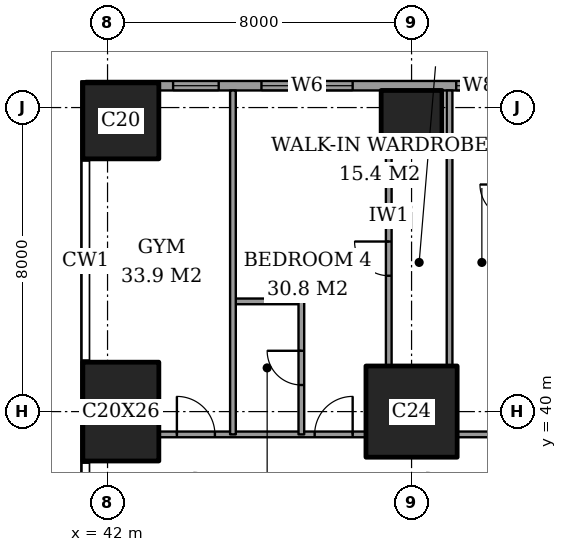
"""IFC4 building model, lengths in metres.
Left out: names, types, materials, properties, quantities, classifications, styles, units other than length and angle.
Written with IfcOpenShell. Run it as: python <this file> out.ifc"""

import sys

from ifc_helpers import new_model, si_unit, direction, frame, frame_2d, origin, origin_2d, place, context, subcontext, project, spatial, rectangle, extrude, element, fill, save


model = new_model("IFC4")
c1 = context("Model", 3, precision=1e-05, world=origin(), true_north=direction((0.0, 1.0)))
c2 = subcontext(c1, "Body", "Model", "MODEL_VIEW")
j1 = project(units=[si_unit("LENGTHUNIT", "METRE"), si_unit("PLANEANGLEUNIT", "RADIAN")], contexts=[c1])
p1 = place(None, origin())
s1 = spatial("IfcSite", under=j1, at=p1, CompositionType="ELEMENT")
p2 = place(p1, origin())
s2 = spatial("IfcBuilding", under=s1, at=p2, CompositionType="ELEMENT")
p3 = place(p2, frame((0.0, 0.0, 259.2)))
s3 = spatial("IfcBuildingStorey", under=s2, at=p3, CompositionType="ELEMENT", Elevation=259.2)
p4 = place(p3, frame((42.35, 40.0, 0.0), z_axis=(0.0, 0.0, 1.0), x_axis=(1.0, 0.0, 0.0)))
e1 = element("IfcColumn", 1, at=p4, inside=s3, PredefinedType="COLUMN", context=c2, shape_type="SweptSolid", body=[
    extrude(rectangle(XDim=2.0, YDim=2.6, at=origin_2d()), origin(), (0.0, 0.0, 1.0), 3.6),
])
p5 = place(p3, frame((42.35, 47.65, 0.0), z_axis=(0.0, 0.0, 1.0), x_axis=(1.0, 0.0, 0.0)))
e2 = element("IfcColumn", 2, at=p5, inside=s3, PredefinedType="COLUMN", context=c2, shape_type="SweptSolid", body=[
    extrude(rectangle(XDim=2.0, YDim=2.0, at=origin_2d()), origin(), (0.0, 0.0, 1.0), 3.6),
])
p6 = place(p3, frame((50.0, 40.0, 0.0), z_axis=(0.0, 0.0, 1.0), x_axis=(1.0, 0.0, 0.0)))
e3 = element("IfcColumn", 3, at=p6, inside=s3, PredefinedType="COLUMN", context=c2, shape_type="SweptSolid", body=[
    extrude(rectangle(XDim=2.4, YDim=2.4, at=origin_2d()), origin(), (0.0, 0.0, 1.0), 3.6),
])
p7 = place(p3, frame((50.0, 47.65, 0.0), z_axis=(0.0, 0.0, 1.0), x_axis=(1.0, 0.0, 0.0)))
e4 = element("IfcColumn", 4, at=p7, inside=s3, PredefinedType="COLUMN", context=c2, shape_type="SweptSolid", body=[
    extrude(rectangle(XDim=1.6, YDim=1.6, at=origin_2d()), origin(), (0.0, 0.0, 1.0), 3.6),
])
p8 = place(p3, frame((62.825, 48.575, 0.0), z_axis=(0.0, 0.0, 1.0), x_axis=(-1.0, 0.0, 0.0)))
e5 = element("IfcWall", 5, at=p8, inside=s3, PredefinedType="SOLIDWALL", context=c2, shape_type="SweptSolid", body=[
    extrude(rectangle(XDim=21.4, YDim=0.25, at=frame_2d((10.7, 0.0))), origin(), (0.0, 0.0, 1.0), 3.6),
])
p9 = place(p8, frame((0.5, 0.0, 0.6)))
e6 = element("IfcOpeningElement", 6, at=p9, cuts=e5, PredefinedType="OPENING", context=c2, shape_type="SweptSolid", body=[
    extrude(rectangle(XDim=1.2, YDim=2.0, at=frame_2d((0.6, 1.0))), frame((0.0, 0.135, 0.0), z_axis=(0.0, -1.0, 0.0), x_axis=(1.0, 0.0, 0.0)), (0.0, 0.0, 1.0), 0.27),
])
p10 = place(p8, frame((2.45, 0.0, 0.6)))
e7 = element("IfcOpeningElement", 7, at=p10, cuts=e5, PredefinedType="OPENING", context=c2, shape_type="SweptSolid", body=[
    extrude(rectangle(XDim=1.2, YDim=2.0, at=frame_2d((0.6, 1.0))), frame((0.0, 0.135, 0.0), z_axis=(0.0, -1.0, 0.0), x_axis=(1.0, 0.0, 0.0)), (0.0, 0.0, 1.0), 0.27),
])
p11 = place(p8, frame((6.775, 0.0, 0.6)))
e8 = element("IfcOpeningElement", 8, at=p11, cuts=e5, PredefinedType="OPENING", context=c2, shape_type="SweptSolid", body=[
    extrude(rectangle(XDim=2.4, YDim=2.0, at=frame_2d((1.2, 1.0))), frame((0.0, 0.135, 0.0), z_axis=(0.0, -1.0, 0.0), x_axis=(1.0, 0.0, 0.0)), (0.0, 0.0, 1.0), 0.27),
])
p12 = place(p8, frame((10.45, 0.0, 0.6)))
e9 = element("IfcOpeningElement", 9, at=p12, cuts=e5, PredefinedType="OPENING", context=c2, shape_type="SweptSolid", body=[
    extrude(rectangle(XDim=1.2, YDim=2.0, at=frame_2d((0.6, 1.0))), frame((0.0, 0.135, 0.0), z_axis=(0.0, -1.0, 0.0), x_axis=(1.0, 0.0, 0.0)), (0.0, 0.0, 1.0), 0.27),
])
p13 = place(p8, frame((14.375, 0.0, 0.6)))
e10 = element("IfcOpeningElement", 10, at=p13, cuts=e5, PredefinedType="OPENING", context=c2, shape_type="SweptSolid", body=[
    extrude(rectangle(XDim=2.4, YDim=2.0, at=frame_2d((1.2, 1.0))), frame((0.0, 0.135, 0.0), z_axis=(0.0, -1.0, 0.0), x_axis=(1.0, 0.0, 0.0)), (0.0, 0.0, 1.0), 0.27),
])
p14 = place(p8, frame((17.9, 0.0, 0.6)))
e11 = element("IfcOpeningElement", 11, at=p14, cuts=e5, PredefinedType="OPENING", context=c2, shape_type="SweptSolid", body=[
    extrude(rectangle(XDim=1.2, YDim=2.0, at=frame_2d((0.6, 1.0))), frame((0.0, 0.135, 0.0), z_axis=(0.0, -1.0, 0.0), x_axis=(1.0, 0.0, 0.0)), (0.0, 0.0, 1.0), 0.27),
])
p15 = place(p3, frame((43.35, 39.4, 0.0), z_axis=(0.0, 0.0, 1.0), x_axis=(1.0, 0.0, 0.0)))
e12 = element("IfcWall", 12, at=p15, inside=s3, PredefinedType="PARTITIONING", context=c2, shape_type="SweptSolid", body=[
    extrude(rectangle(XDim=5.45, YDim=0.15, at=frame_2d((2.725, 0.0))), origin(), (0.0, 0.0, 1.0), 3.35),
])
p16 = place(p15, frame((4.1, 0.0, 0.0)))
e13 = element("IfcOpeningElement", 13, at=p16, cuts=e12, PredefinedType="OPENING", context=c2, shape_type="SweptSolid", body=[
    extrude(rectangle(XDim=1.0, YDim=2.1, at=frame_2d((0.5, 1.05))), frame((0.0, 0.085, 0.0), z_axis=(0.0, -1.0, 0.0), x_axis=(1.0, 0.0, 0.0)), (0.0, 0.0, 1.0), 0.17),
])
p17 = place(p15, frame((0.475, 0.0, 0.0)))
e14 = element("IfcOpeningElement", 14, at=p17, cuts=e12, PredefinedType="OPENING", context=c2, shape_type="SweptSolid", body=[
    extrude(rectangle(XDim=1.0, YDim=2.1, at=frame_2d((0.5, 1.05))), frame((0.0, 0.085, 0.0), z_axis=(0.0, -1.0, 0.0), x_axis=(1.0, 0.0, 0.0)), (0.0, 0.0, 1.0), 0.17),
])
p18 = place(p3, frame((51.2, 39.4, 0.0), z_axis=(0.0, 0.0, 1.0), x_axis=(1.0, 0.0, 0.0)))
e15 = element("IfcWall", 15, at=p18, inside=s3, PredefinedType="PARTITIONING", context=c2, shape_type="SweptSolid", body=[
    extrude(rectangle(XDim=6.0, YDim=0.15, at=frame_2d((3.0, 0.0))), origin(), (0.0, 0.0, 1.0), 3.35),
])
p19 = place(p18, frame((4.15, 0.0, 0.0)))
e16 = element("IfcOpeningElement", 16, at=p19, cuts=e15, PredefinedType="OPENING", context=c2, shape_type="SweptSolid", body=[
    extrude(rectangle(XDim=1.0, YDim=2.1, at=frame_2d((0.5, 1.05))), frame((0.0, 0.085, 0.0), z_axis=(0.0, -1.0, 0.0), x_axis=(1.0, 0.0, 0.0)), (0.0, 0.0, 1.0), 0.17),
])
p20 = place(p3, frame((45.3, 42.9, 0.0), z_axis=(0.0, 0.0, 1.0), x_axis=(1.0, 0.0, 0.0)))
e17 = element("IfcWall", 17, at=p20, inside=s3, PredefinedType="PARTITIONING", context=c2, shape_type="SweptSolid", body=[
    extrude(rectangle(XDim=1.8, YDim=0.15, at=frame_2d((0.9, 0.0))), origin(), (0.0, 0.0, 1.0), 3.35),
])
p21 = place(p3, frame((45.3, 39.4, 0.0), z_axis=(0.0, 0.0, 1.0), x_axis=(0.0, 1.0, 0.0)))
e18 = element("IfcWall", 18, at=p21, inside=s3, PredefinedType="PARTITIONING", context=c2, shape_type="SweptSolid", body=[
    extrude(rectangle(XDim=9.05, YDim=0.15, at=frame_2d((4.525, 0.0))), origin(), (0.0, 0.0, 1.0), 3.35),
])
p22 = place(p3, frame((47.1, 39.4, 0.0), z_axis=(0.0, 0.0, 1.0), x_axis=(0.0, 1.0, 0.0)))
e19 = element("IfcWall", 19, at=p22, inside=s3, PredefinedType="PARTITIONING", context=c2, shape_type="SweptSolid", body=[
    extrude(rectangle(XDim=3.5, YDim=0.15, at=frame_2d((1.75, 0.0))), origin(), (0.0, 0.0, 1.0), 3.35),
])
p23 = place(p22, frame((1.3, 0.0, 0.0)))
e20 = element("IfcOpeningElement", 20, at=p23, cuts=e19, PredefinedType="OPENING", context=c2, shape_type="SweptSolid", body=[
    extrude(rectangle(XDim=0.9, YDim=2.1, at=frame_2d((0.45, 1.05))), frame((0.0, 0.085, 0.0), z_axis=(0.0, -1.0, 0.0), x_axis=(1.0, 0.0, 0.0)), (0.0, 0.0, 1.0), 0.17),
])
p24 = place(p3, frame((49.4, 41.2, 0.0), z_axis=(0.0, 0.0, 1.0), x_axis=(0.0, 1.0, 0.0)))
e21 = element("IfcWall", 21, at=p24, inside=s3, PredefinedType="PARTITIONING", context=c2, shape_type="SweptSolid", body=[
    extrude(rectangle(XDim=5.65, YDim=0.15, at=frame_2d((2.825, 0.0))), origin(), (0.0, 0.0, 1.0), 3.35),
])
p25 = place(p24, frame((2.375, 0.0, 0.0)))
e22 = element("IfcOpeningElement", 22, at=p25, cuts=e21, PredefinedType="OPENING", context=c2, shape_type="SweptSolid", body=[
    extrude(rectangle(XDim=0.9, YDim=2.1, at=frame_2d((0.45, 1.05))), frame((0.0, 0.085, 0.0), z_axis=(0.0, -1.0, 0.0), x_axis=(1.0, 0.0, 0.0)), (0.0, 0.0, 1.0), 0.17),
])
p26 = place(p3, frame((51.0, 41.2, 0.0), z_axis=(0.0, 0.0, 1.0), x_axis=(0.0, 1.0, 0.0)))
e23 = element("IfcWall", 23, at=p26, inside=s3, PredefinedType="PARTITIONING", context=c2, shape_type="SweptSolid", body=[
    extrude(rectangle(XDim=7.25, YDim=0.15, at=frame_2d((3.625, 0.0))), origin(), (0.0, 0.0, 1.0), 3.35),
])
p27 = place(p12, origin())
e24 = element("IfcWindow", 24, at=p27, inside=s3, PartitioningType="SINGLE_PANEL", PredefinedType="WINDOW", context=c2, shape_type="SweptSolid", body=[
    extrude(rectangle(XDim=1.2, YDim=2.0, at=frame_2d((0.6, 1.0))), frame((0.0, 0.03, 0.0), z_axis=(0.0, -1.0, 0.0), x_axis=(1.0, 0.0, 0.0)), (0.0, 0.0, 1.0), 0.06),
])
fill(e9, e24)
p28 = place(p13, origin())
e25 = element("IfcWindow", 25, at=p28, inside=s3, PartitioningType="SINGLE_PANEL", PredefinedType="WINDOW", context=c2, shape_type="SweptSolid", body=[
    extrude(rectangle(XDim=2.4, YDim=2.0, at=frame_2d((1.2, 1.0))), frame((0.0, 0.03, 0.0), z_axis=(0.0, -1.0, 0.0), x_axis=(1.0, 0.0, 0.0)), (0.0, 0.0, 1.0), 0.06),
])
fill(e10, e25)
p29 = place(p14, origin())
e26 = element("IfcWindow", 26, at=p29, inside=s3, PartitioningType="SINGLE_PANEL", PredefinedType="WINDOW", context=c2, shape_type="SweptSolid", body=[
    extrude(rectangle(XDim=1.2, YDim=2.0, at=frame_2d((0.6, 1.0))), frame((0.0, 0.03, 0.0), z_axis=(0.0, -1.0, 0.0), x_axis=(1.0, 0.0, 0.0)), (0.0, 0.0, 1.0), 0.06),
])
fill(e11, e26)
p30 = place(p25, origin())
e27 = element("IfcDoor", 27, at=p30, inside=s3, OperationType="SINGLE_SWING_LEFT", PredefinedType="DOOR", context=c2, shape_type="SweptSolid", body=[
    extrude(rectangle(XDim=0.9, YDim=2.1, at=frame_2d((0.45, 1.05))), frame((0.0, 0.025, 0.0), z_axis=(0.0, -1.0, 0.0), x_axis=(1.0, 0.0, 0.0)), (0.0, 0.0, 1.0), 0.05),
])
fill(e22, e27)
p31 = place(p23, origin())
e28 = element("IfcDoor", 28, at=p31, inside=s3, OperationType="SINGLE_SWING_LEFT", PredefinedType="DOOR", context=c2, shape_type="SweptSolid", body=[
    extrude(rectangle(XDim=0.9, YDim=2.1, at=frame_2d((0.45, 1.05))), frame((0.0, 0.025, 0.0), z_axis=(0.0, -1.0, 0.0), x_axis=(1.0, 0.0, 0.0)), (0.0, 0.0, 1.0), 0.05),
])
fill(e20, e28)
p32 = place(p16, origin())
e29 = element("IfcDoor", 29, at=p32, inside=s3, OperationType="SINGLE_SWING_LEFT", PredefinedType="DOOR", context=c2, shape_type="SweptSolid", body=[
    extrude(rectangle(XDim=1.0, YDim=2.1, at=frame_2d((0.5, 1.05))), frame((0.0, 0.025, 0.0), z_axis=(0.0, -1.0, 0.0), x_axis=(1.0, 0.0, 0.0)), (0.0, 0.0, 1.0), 0.05),
])
fill(e13, e29)
p33 = place(p17, origin())
e30 = element("IfcDoor", 30, at=p33, inside=s3, OperationType="SINGLE_SWING_RIGHT", PredefinedType="DOOR", context=c2, shape_type="SweptSolid", body=[
    extrude(rectangle(XDim=1.0, YDim=2.1, at=frame_2d((0.5, 1.05))), frame((0.0, 0.025, 0.0), z_axis=(0.0, -1.0, 0.0), x_axis=(1.0, 0.0, 0.0)), (0.0, 0.0, 1.0), 0.05),
])
fill(e14, e30)
save(model, sys.argv[1])
